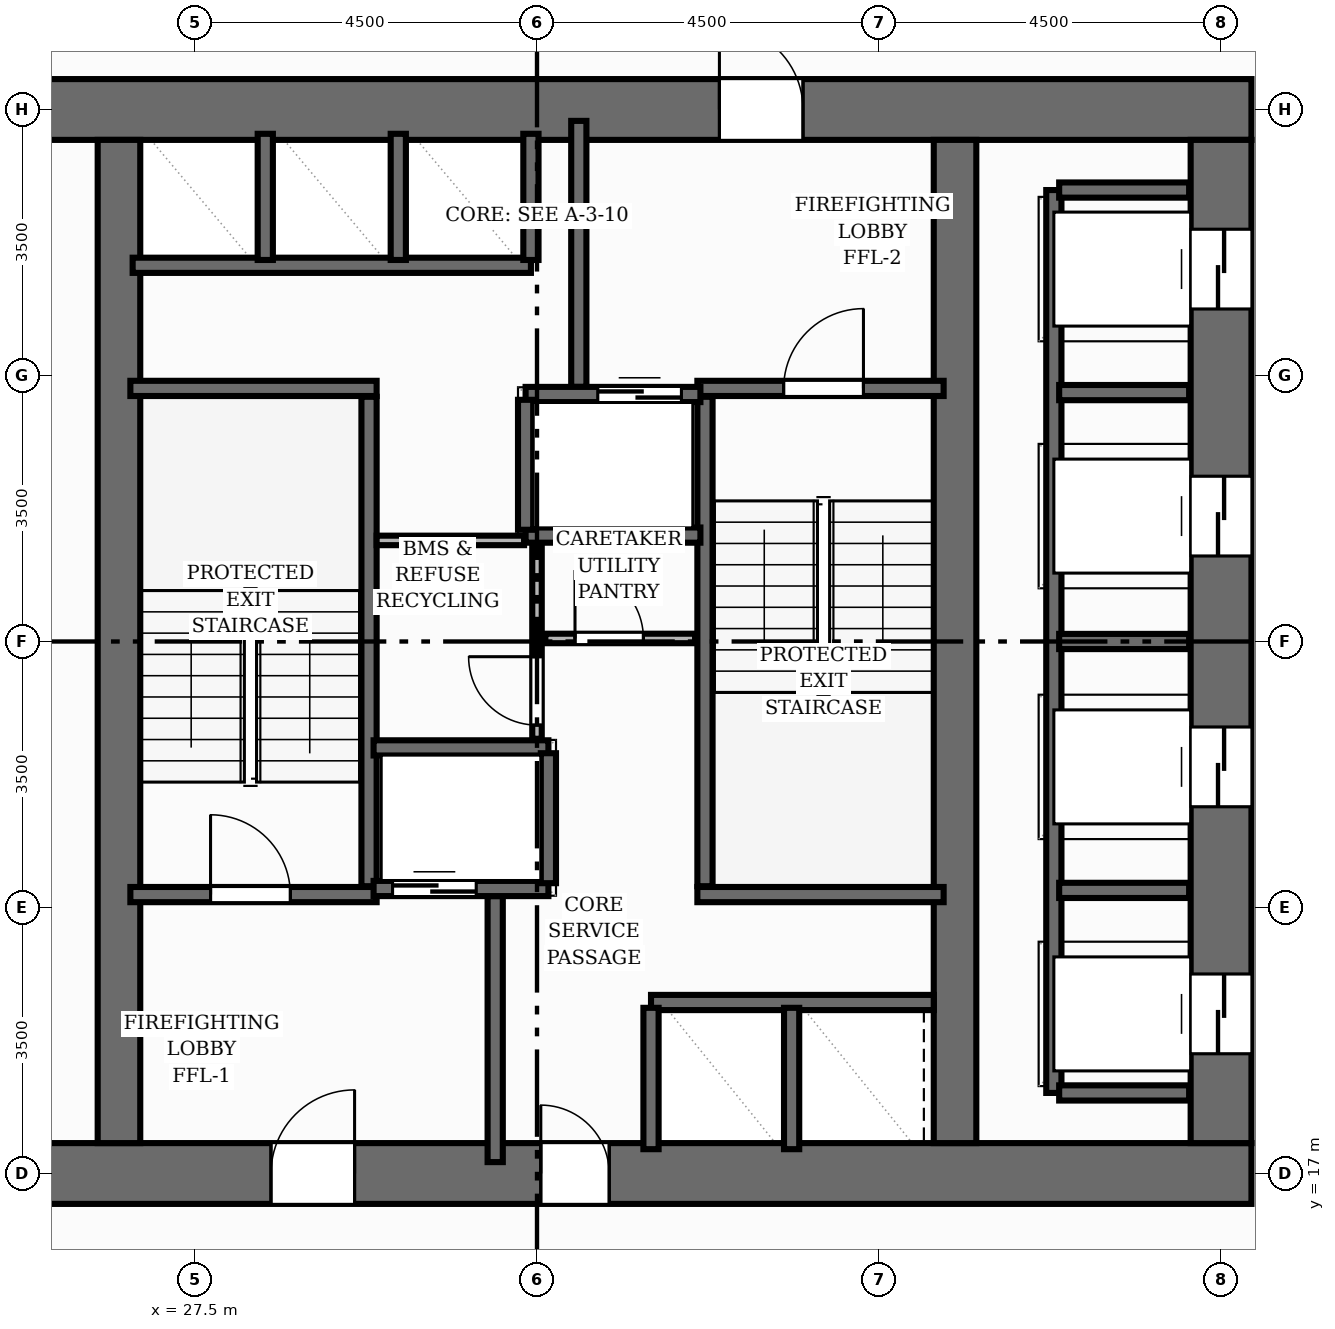
"""IFC4 building model, lengths in metres.
Left out: names, types, materials, properties, quantities, classifications, styles, units other than length and angle.
Written with IfcOpenShell. Run it as: python <this file> out.ifc"""

import sys

from ifc_helpers import new_model, si_unit, direction, frame, frame_2d, origin, place, context, subcontext, project, spatial, rectangle, extrude, element, fill, save


model = new_model("IFC4")
c1 = context("Model", 3, precision=1e-05, world=origin(), true_north=direction((0.0, 1.0)))
c2 = subcontext(c1, "Body", "Model", "MODEL_VIEW")
j1 = project(units=[si_unit("LENGTHUNIT", "METRE"), si_unit("PLANEANGLEUNIT", "RADIAN")], contexts=[c1])
p1 = place(None, origin())
s1 = spatial("IfcSite", under=j1, at=p1, CompositionType="ELEMENT")
p2 = place(p1, origin())
s2 = spatial("IfcBuilding", under=s1, at=p2, CompositionType="ELEMENT")
p3 = place(p2, frame((0.0, 0.0, 37.6)))
s3 = spatial("IfcBuildingStorey", under=s2, at=p3, CompositionType="ELEMENT", Elevation=37.6)
p4 = place(p3, frame((22.6, 17.0, 0.0), z_axis=(0.0, 0.0, 1.0), x_axis=(1.0, 0.0, 0.0)))
e1 = element("IfcWall", 1, at=p4, inside=s3, PredefinedType="SHEAR", context=c2, shape_type="SweptSolid", body=[
    extrude(rectangle(XDim=18.8, YDim=0.8, at=frame_2d((9.4, 0.0))), origin(), (0.0, 0.0, 1.0), 3.2),
])
p5 = place(p4, frame((5.9, 0.0, 0.0)))
e2 = element("IfcOpeningElement", 2, at=p5, cuts=e1, PredefinedType="OPENING", context=c2, shape_type="SweptSolid", body=[
    extrude(rectangle(XDim=1.1, YDim=2.15, at=frame_2d((0.55, 1.075))), frame((0.0, 0.41, 0.0), z_axis=(0.0, -1.0, 0.0), x_axis=(1.0, 0.0, 0.0)), (0.0, 0.0, 1.0), 0.82),
])
p6 = place(p4, frame((9.45, 0.0, 0.0)))
e3 = element("IfcOpeningElement", 3, at=p6, cuts=e1, PredefinedType="OPENING", context=c2, shape_type="SweptSolid", body=[
    extrude(rectangle(XDim=0.9, YDim=2.1, at=frame_2d((0.45, 1.05))), frame((0.0, 0.41, 0.0), z_axis=(0.0, -1.0, 0.0), x_axis=(1.0, 0.0, 0.0)), (0.0, 0.0, 1.0), 0.82),
])
p7 = place(p3, frame((22.6, 31.0, 0.0), z_axis=(0.0, 0.0, 1.0), x_axis=(1.0, 0.0, 0.0)))
e4 = element("IfcWall", 4, at=p7, inside=s3, PredefinedType="SHEAR", context=c2, shape_type="SweptSolid", body=[
    extrude(rectangle(XDim=18.8, YDim=0.8, at=frame_2d((9.4, 0.0))), origin(), (0.0, 0.0, 1.0), 3.2),
])
p8 = place(p7, frame((11.8, 0.0, 0.0)))
e5 = element("IfcOpeningElement", 5, at=p8, cuts=e4, PredefinedType="OPENING", context=c2, shape_type="SweptSolid", body=[
    extrude(rectangle(XDim=1.1, YDim=2.15, at=frame_2d((0.55, 1.075))), frame((0.0, 0.41, 0.0), z_axis=(0.0, -1.0, 0.0), x_axis=(1.0, 0.0, 0.0)), (0.0, 0.0, 1.0), 0.82),
])
p9 = place(p3, frame((41.0, 17.4, 0.0), z_axis=(0.0, 0.0, 1.0), x_axis=(0.0, 1.0, 0.0)))
e6 = element("IfcWall", 6, at=p9, inside=s3, PredefinedType="SHEAR", context=c2, shape_type="SweptSolid", body=[
    extrude(rectangle(XDim=13.2, YDim=0.8, at=frame_2d((6.6, 0.0))), origin(), (0.0, 0.0, 1.0), 3.2),
])
p10 = place(p9, frame((1.175, 0.0, 0.0)))
e7 = element("IfcOpeningElement", 7, at=p10, cuts=e6, PredefinedType="OPENING", context=c2, shape_type="SweptSolid", body=[
    extrude(rectangle(XDim=1.05, YDim=2.15, at=frame_2d((0.525, 1.075))), frame((0.0, 0.41, 0.0), z_axis=(0.0, -1.0, 0.0), x_axis=(1.0, 0.0, 0.0)), (0.0, 0.0, 1.0), 0.82),
])
p11 = place(p9, frame((4.425, 0.0, 0.0)))
e8 = element("IfcOpeningElement", 8, at=p11, cuts=e6, PredefinedType="OPENING", context=c2, shape_type="SweptSolid", body=[
    extrude(rectangle(XDim=1.05, YDim=2.15, at=frame_2d((0.525, 1.075))), frame((0.0, 0.41, 0.0), z_axis=(0.0, -1.0, 0.0), x_axis=(1.0, 0.0, 0.0)), (0.0, 0.0, 1.0), 0.82),
])
p12 = place(p9, frame((7.725, 0.0, 0.0)))
e9 = element("IfcOpeningElement", 9, at=p12, cuts=e6, PredefinedType="OPENING", context=c2, shape_type="SweptSolid", body=[
    extrude(rectangle(XDim=1.05, YDim=2.15, at=frame_2d((0.525, 1.075))), frame((0.0, 0.41, 0.0), z_axis=(0.0, -1.0, 0.0), x_axis=(1.0, 0.0, 0.0)), (0.0, 0.0, 1.0), 0.82),
])
p13 = place(p9, frame((10.975, 0.0, 0.0)))
e10 = element("IfcOpeningElement", 10, at=p13, cuts=e6, PredefinedType="OPENING", context=c2, shape_type="SweptSolid", body=[
    extrude(rectangle(XDim=1.05, YDim=2.15, at=frame_2d((0.525, 1.075))), frame((0.0, 0.41, 0.0), z_axis=(0.0, -1.0, 0.0), x_axis=(1.0, 0.0, 0.0)), (0.0, 0.0, 1.0), 0.82),
])
for number, where, z_axis, x_axis in (
    (11, (26.5, 17.4, 0.0), (0.0, 0.0, 1.0), (0.0, 1.0, 0.0)),
    (12, (37.5, 17.4, 0.0), (0.0, 0.0, 1.0), (0.0, 1.0, 0.0)),
):
    element("IfcWall", number, at=place(p3, frame(where, z_axis=z_axis, x_axis=x_axis)), inside=s3, PredefinedType="SHEAR", context=c2, shape_type="SweptSolid", body=[
        extrude(rectangle(XDim=13.2, YDim=0.56, at=frame_2d((6.6, 0.0))), origin(), (0.0, 0.0, 1.0), 3.2),
    ])
p14 = place(p3, frame((29.79, 20.78, 0.0), z_axis=(0.0, 0.0, 1.0), x_axis=(0.0, 1.0, 0.0)))
e13 = element("IfcWall", 13, at=p14, inside=s3, PredefinedType="SHEAR", context=c2, shape_type="SweptSolid", body=[
    extrude(rectangle(XDim=6.44, YDim=0.2, at=frame_2d((3.22, 0.0))), origin(), (0.0, 0.0, 1.0), 3.2),
])
p15 = place(p3, frame((26.65, 27.33, 0.0), z_axis=(0.0, 0.0, 1.0), x_axis=(1.0, 0.0, 0.0)))
e14 = element("IfcWall", 14, at=p15, inside=s3, PredefinedType="SHEAR", context=c2, shape_type="SweptSolid", body=[
    extrude(rectangle(XDim=3.24, YDim=0.2, at=frame_2d((1.62, 0.0))), origin(), (0.0, 0.0, 1.0), 3.2),
])
p16 = place(p3, frame((26.65, 20.67, 0.0), z_axis=(0.0, 0.0, 1.0), x_axis=(1.0, 0.0, 0.0)))
e15 = element("IfcWall", 15, at=p16, inside=s3, PredefinedType="SHEAR", context=c2, shape_type="SweptSolid", body=[
    extrude(rectangle(XDim=3.24, YDim=0.2, at=frame_2d((1.62, 0.0))), origin(), (0.0, 0.0, 1.0), 3.2),
])
p17 = place(p16, frame((1.055, 0.0, 0.0)))
e16 = element("IfcOpeningElement", 16, at=p17, cuts=e15, PredefinedType="OPENING", context=c2, shape_type="SweptSolid", body=[
    extrude(rectangle(XDim=1.05, YDim=2.15, at=frame_2d((0.525, 1.075))), frame((0.0, 0.11, 0.0), z_axis=(0.0, -1.0, 0.0), x_axis=(1.0, 0.0, 0.0)), (0.0, 0.0, 1.0), 0.22),
])
p18 = place(p3, frame((34.21, 20.78, 0.0), z_axis=(0.0, 0.0, 1.0), x_axis=(0.0, 1.0, 0.0)))
e17 = element("IfcWall", 17, at=p18, inside=s3, PredefinedType="SHEAR", context=c2, shape_type="SweptSolid", body=[
    extrude(rectangle(XDim=6.44, YDim=0.2, at=frame_2d((3.22, 0.0))), origin(), (0.0, 0.0, 1.0), 3.2),
])
p19 = place(p3, frame((34.11, 20.67, 0.0), z_axis=(0.0, 0.0, 1.0), x_axis=(1.0, 0.0, 0.0)))
e18 = element("IfcWall", 18, at=p19, inside=s3, PredefinedType="SHEAR", context=c2, shape_type="SweptSolid", body=[
    extrude(rectangle(XDim=3.24, YDim=0.2, at=frame_2d((1.62, 0.0))), origin(), (0.0, 0.0, 1.0), 3.2),
])
p20 = place(p3, frame((34.11, 27.33, 0.0), z_axis=(0.0, 0.0, 1.0), x_axis=(1.0, 0.0, 0.0)))
e19 = element("IfcWall", 19, at=p20, inside=s3, PredefinedType="SHEAR", context=c2, shape_type="SweptSolid", body=[
    extrude(rectangle(XDim=3.24, YDim=0.2, at=frame_2d((1.62, 0.0))), origin(), (0.0, 0.0, 1.0), 3.2),
])
p21 = place(p20, frame((1.135, 0.0, 0.0)))
e20 = element("IfcOpeningElement", 20, at=p21, cuts=e19, PredefinedType="OPENING", context=c2, shape_type="SweptSolid", body=[
    extrude(rectangle(XDim=1.05, YDim=2.15, at=frame_2d((0.525, 1.075))), frame((0.0, 0.11, 0.0), z_axis=(0.0, -1.0, 0.0), x_axis=(1.0, 0.0, 0.0)), (0.0, 0.0, 1.0), 0.22),
])
for number, where, z_axis, x_axis in (
    (21, (31.45, 17.15, 0.0), (0.0, 0.0, 1.0), (0.0, 1.0, 0.0)),
    (22, (32.55, 27.35, 0.0), (0.0, 0.0, 1.0), (0.0, 1.0, 0.0)),
):
    element("IfcWall", number, at=place(p3, frame(where, z_axis=z_axis, x_axis=x_axis)), inside=s3, PredefinedType="SHEAR", context=c2, shape_type="SweptSolid", body=[
        extrude(rectangle(XDim=3.5, YDim=0.2, at=frame_2d((1.75, 0.0))), origin(), (0.0, 0.0, 1.0), 3.2),
    ])
p22 = place(p3, frame((29.85, 20.75, 0.0), z_axis=(0.0, 0.0, 1.0), x_axis=(1.0, 0.0, 0.0)))
e23 = element("IfcWall", 23, at=p22, inside=s3, PredefinedType="SHEAR", context=c2, shape_type="SweptSolid", body=[
    extrude(rectangle(XDim=2.3, YDim=0.2, at=frame_2d((1.15, 0.0))), origin(), (0.0, 0.0, 1.0), 3.2),
])
p23 = place(p22, frame((0.25, 0.0, 0.0)))
e24 = element("IfcOpeningElement", 24, at=p23, cuts=e23, PredefinedType="OPENING", context=c2, shape_type="SweptSolid", body=[
    extrude(rectangle(XDim=1.1, YDim=2.15, at=frame_2d((0.55, 1.075))), frame((0.0, 0.11, 0.0), z_axis=(0.0, -1.0, 0.0), x_axis=(1.0, 0.0, 0.0)), (0.0, 0.0, 1.0), 0.22),
])
p24 = place(p3, frame((29.85, 22.6, 0.0), z_axis=(0.0, 0.0, 1.0), x_axis=(1.0, 0.0, 0.0)))
e25 = element("IfcWall", 25, at=p24, inside=s3, PredefinedType="SHEAR", context=c2, shape_type="SweptSolid", body=[
    extrude(rectangle(XDim=2.3, YDim=0.2, at=frame_2d((1.15, 0.0))), origin(), (0.0, 0.0, 1.0), 3.2),
])
p25 = place(p3, frame((32.15, 20.82, 0.0), z_axis=(0.0, 0.0, 1.0), x_axis=(0.0, 1.0, 0.0)))
e26 = element("IfcWall", 26, at=p25, inside=s3, PredefinedType="SHEAR", context=c2, shape_type="SweptSolid", body=[
    extrude(rectangle(XDim=1.71, YDim=0.2, at=frame_2d((0.855, 0.0))), origin(), (0.0, 0.0, 1.0), 3.2),
])
p26 = place(p3, frame((31.85, 27.25, 0.0), z_axis=(0.0, 0.0, 1.0), x_axis=(1.0, 0.0, 0.0)))
e27 = element("IfcWall", 27, at=p26, inside=s3, PredefinedType="SHEAR", context=c2, shape_type="SweptSolid", body=[
    extrude(rectangle(XDim=2.3, YDim=0.2, at=frame_2d((1.15, 0.0))), origin(), (0.0, 0.0, 1.0), 3.2),
])
p27 = place(p26, frame((0.95, 0.0, 0.0)))
e28 = element("IfcOpeningElement", 28, at=p27, cuts=e27, PredefinedType="OPENING", context=c2, shape_type="SweptSolid", body=[
    extrude(rectangle(XDim=1.1, YDim=2.15, at=frame_2d((0.55, 1.075))), frame((0.0, 0.11, 0.0), z_axis=(0.0, -1.0, 0.0), x_axis=(1.0, 0.0, 0.0)), (0.0, 0.0, 1.0), 0.22),
])
p28 = place(p3, frame((31.85, 25.4, 0.0), z_axis=(0.0, 0.0, 1.0), x_axis=(1.0, 0.0, 0.0)))
e29 = element("IfcWall", 29, at=p28, inside=s3, PredefinedType="SHEAR", context=c2, shape_type="SweptSolid", body=[
    extrude(rectangle(XDim=2.3, YDim=0.2, at=frame_2d((1.15, 0.0))), origin(), (0.0, 0.0, 1.0), 3.2),
])
p29 = place(p3, frame((31.85, 25.47, 0.0), z_axis=(0.0, 0.0, 1.0), x_axis=(0.0, 1.0, 0.0)))
e30 = element("IfcWall", 30, at=p29, inside=s3, PredefinedType="SHEAR", context=c2, shape_type="SweptSolid", body=[
    extrude(rectangle(XDim=1.71, YDim=0.2, at=frame_2d((0.855, 0.0))), origin(), (0.0, 0.0, 1.0), 3.2),
])
p30 = place(p3, frame((38.8, 18.06, 0.0), z_axis=(0.0, 0.0, 1.0), x_axis=(0.0, 1.0, 0.0)))
e31 = element("IfcWall", 31, at=p30, inside=s3, PredefinedType="SHEAR", context=c2, shape_type="SweptSolid", body=[
    extrude(rectangle(XDim=11.88, YDim=0.2, at=frame_2d((5.94, 0.0))), origin(), (0.0, 0.0, 1.0), 3.2),
])
for number, where, z_axis, x_axis in (
    (32, (38.87, 18.06, 0.0), (0.0, 0.0, 1.0), (1.0, 0.0, 0.0)),
    (33, (38.87, 29.94, 0.0), (0.0, 0.0, 1.0), (1.0, 0.0, 0.0)),
    (34, (38.87, 20.725, 0.0), (0.0, 0.0, 1.0), (1.0, 0.0, 0.0)),
    (35, (38.87, 24.0, 0.0), (0.0, 0.0, 1.0), (1.0, 0.0, 0.0)),
    (36, (38.87, 27.275, 0.0), (0.0, 0.0, 1.0), (1.0, 0.0, 0.0)),
):
    element("IfcWall", number, at=place(p3, frame(where, z_axis=z_axis, x_axis=x_axis)), inside=s3, PredefinedType="SHEAR", context=c2, shape_type="SweptSolid", body=[
        extrude(rectangle(XDim=1.71, YDim=0.2, at=frame_2d((0.855, 0.0))), origin(), (0.0, 0.0, 1.0), 3.2),
    ])
p31 = place(p3, frame((26.68, 28.95, 0.0), z_axis=(0.0, 0.0, 1.0), x_axis=(1.0, 0.0, 0.0)))
e37 = element("IfcWall", 37, at=p31, inside=s3, PredefinedType="SHEAR", context=c2, shape_type="SweptSolid", body=[
    extrude(rectangle(XDim=5.24, YDim=0.2, at=frame_2d((2.62, 0.0))), origin(), (0.0, 0.0, 1.0), 3.2),
])
for number, where, z_axis, x_axis in (
    (38, (31.92, 29.02, 0.0), (0.0, 0.0, 1.0), (0.0, 1.0, 0.0)),
    (39, (28.425, 29.02, 0.0), (0.0, 0.0, 1.0), (0.0, 1.0, 0.0)),
    (40, (30.175, 29.02, 0.0), (0.0, 0.0, 1.0), (0.0, 1.0, 0.0)),
):
    element("IfcWall", number, at=place(p3, frame(where, z_axis=z_axis, x_axis=x_axis)), inside=s3, PredefinedType="SHEAR", context=c2, shape_type="SweptSolid", body=[
        extrude(rectangle(XDim=1.66, YDim=0.2, at=frame_2d((0.83, 0.0))), origin(), (0.0, 0.0, 1.0), 3.2),
    ])
p32 = place(p3, frame((33.5, 19.25, 0.0), z_axis=(0.0, 0.0, 1.0), x_axis=(1.0, 0.0, 0.0)))
e41 = element("IfcWall", 41, at=p32, inside=s3, PredefinedType="SHEAR", context=c2, shape_type="SweptSolid", body=[
    extrude(rectangle(XDim=3.72, YDim=0.2, at=frame_2d((1.86, 0.0))), origin(), (0.0, 0.0, 1.0), 3.2),
])
for number, where, z_axis, x_axis in (
    (42, (33.5, 17.32, 0.0), (0.0, 0.0, 1.0), (0.0, 1.0, 0.0)),
    (43, (35.35, 17.32, 0.0), (0.0, 0.0, 1.0), (0.0, 1.0, 0.0)),
):
    element("IfcWall", number, at=place(p3, frame(where, z_axis=z_axis, x_axis=x_axis)), inside=s3, PredefinedType="SHEAR", context=c2, shape_type="SweptSolid", body=[
        extrude(rectangle(XDim=1.86, YDim=0.2, at=frame_2d((0.93, 0.0))), origin(), (0.0, 0.0, 1.0), 3.2),
    ])
p33 = place(p3, frame((32.0, 22.72, 0.0), z_axis=(0.0, 0.0, 1.0), x_axis=(0.0, 1.0, 0.0)))
e44 = element("IfcWall", 44, at=p33, inside=s3, PredefinedType="PARTITIONING", context=c2, shape_type="SweptSolid", body=[
    extrude(rectangle(XDim=2.52, YDim=0.125, at=frame_2d((1.26, 0.0))), origin(), (0.0, 0.0, 1.0), 2.955),
])
p34 = place(p33, frame((0.18, 0.0, 0.0)))
e45 = element("IfcOpeningElement", 45, at=p34, cuts=e44, PredefinedType="OPENING", context=c2, shape_type="SweptSolid", body=[
    extrude(rectangle(XDim=0.9, YDim=2.1, at=frame_2d((0.45, 1.05))), frame((0.0, 0.073, 0.0), z_axis=(0.0, -1.0, 0.0), x_axis=(1.0, 0.0, 0.0)), (0.0, 0.0, 1.0), 0.145),
])
p35 = place(p3, frame((32.11, 24.04, 0.0), z_axis=(0.0, 0.0, 1.0), x_axis=(1.0, 0.0, 0.0)))
e46 = element("IfcWall", 46, at=p35, inside=s3, PredefinedType="PARTITIONING", context=c2, shape_type="SweptSolid", body=[
    extrude(rectangle(XDim=1.97, YDim=0.125, at=frame_2d((0.985, 0.0))), origin(), (0.0, 0.0, 1.0), 2.955),
])
p36 = place(p35, frame((0.39, 0.0, 0.0)))
e47 = element("IfcOpeningElement", 47, at=p36, cuts=e46, PredefinedType="OPENING", context=c2, shape_type="SweptSolid", body=[
    extrude(rectangle(XDim=0.9, YDim=2.1, at=frame_2d((0.45, 1.05))), frame((0.0, 0.073, 0.0), z_axis=(0.0, -1.0, 0.0), x_axis=(1.0, 0.0, 0.0)), (0.0, 0.0, 1.0), 0.145),
])
p37 = place(p3, frame((29.89, 25.33, 0.0), z_axis=(0.0, 0.0, 1.0), x_axis=(1.0, 0.0, 0.0)))
e48 = element("IfcWall", 48, at=p37, inside=s3, PredefinedType="PARTITIONING", context=c2, shape_type="SweptSolid", body=[
    extrude(rectangle(XDim=1.94, YDim=0.125, at=frame_2d((0.97, 0.0))), origin(), (0.0, 0.0, 1.0), 2.955),
])
p38 = place(p17, origin())
e49 = element("IfcDoor", 49, at=p38, inside=s3, OperationType="SINGLE_SWING_LEFT", PredefinedType="DOOR", context=c2, shape_type="SweptSolid", body=[
    extrude(rectangle(XDim=1.05, YDim=2.15, at=frame_2d((0.525, 1.075))), frame((0.0, 0.025, 0.0), z_axis=(0.0, -1.0, 0.0), x_axis=(1.0, 0.0, 0.0)), (0.0, 0.0, 1.0), 0.05),
])
fill(e16, e49)
p39 = place(p21, origin())
e50 = element("IfcDoor", 50, at=p39, inside=s3, OperationType="SINGLE_SWING_RIGHT", PredefinedType="DOOR", context=c2, shape_type="SweptSolid", body=[
    extrude(rectangle(XDim=1.05, YDim=2.15, at=frame_2d((0.525, 1.075))), frame((0.0, 0.025, 0.0), z_axis=(0.0, -1.0, 0.0), x_axis=(1.0, 0.0, 0.0)), (0.0, 0.0, 1.0), 0.05),
])
fill(e20, e50)
p40 = place(p5, origin())
e51 = element("IfcDoor", 51, at=p40, inside=s3, OperationType="SINGLE_SWING_RIGHT", PredefinedType="DOOR", context=c2, shape_type="SweptSolid", body=[
    extrude(rectangle(XDim=1.1, YDim=2.15, at=frame_2d((0.55, 1.075))), frame((0.0, 0.025, 0.0), z_axis=(0.0, -1.0, 0.0), x_axis=(1.0, 0.0, 0.0)), (0.0, 0.0, 1.0), 0.05),
])
fill(e2, e51)
p41 = place(p8, origin())
e52 = element("IfcDoor", 52, at=p41, inside=s3, OperationType="SINGLE_SWING_LEFT", PredefinedType="DOOR", context=c2, shape_type="SweptSolid", body=[
    extrude(rectangle(XDim=1.1, YDim=2.15, at=frame_2d((0.55, 1.075))), frame((0.0, 0.025, 0.0), z_axis=(0.0, -1.0, 0.0), x_axis=(1.0, 0.0, 0.0)), (0.0, 0.0, 1.0), 0.05),
])
fill(e5, e52)
p42 = place(p23, origin())
e53 = element("IfcDoor", 53, at=p42, inside=s3, OperationType="DOUBLE_DOOR_SLIDING", PredefinedType="DOOR", context=c2, shape_type="SweptSolid", body=[
    extrude(rectangle(XDim=1.1, YDim=2.15, at=frame_2d((0.55, 1.075))), frame((0.0, 0.025, 0.0), z_axis=(0.0, -1.0, 0.0), x_axis=(1.0, 0.0, 0.0)), (0.0, 0.0, 1.0), 0.05),
])
fill(e24, e53)
p43 = place(p27, origin())
e54 = element("IfcDoor", 54, at=p43, inside=s3, OperationType="DOUBLE_DOOR_SLIDING", PredefinedType="DOOR", context=c2, shape_type="SweptSolid", body=[
    extrude(rectangle(XDim=1.1, YDim=2.15, at=frame_2d((0.55, 1.075))), frame((0.0, 0.025, 0.0), z_axis=(0.0, -1.0, 0.0), x_axis=(1.0, 0.0, 0.0)), (0.0, 0.0, 1.0), 0.05),
])
fill(e28, e54)
p44 = place(p10, origin())
e55 = element("IfcDoor", 55, at=p44, inside=s3, OperationType="DOUBLE_DOOR_SLIDING", PredefinedType="DOOR", context=c2, shape_type="SweptSolid", body=[
    extrude(rectangle(XDim=1.05, YDim=2.15, at=frame_2d((0.525, 1.075))), frame((0.0, 0.025, 0.0), z_axis=(0.0, -1.0, 0.0), x_axis=(1.0, 0.0, 0.0)), (0.0, 0.0, 1.0), 0.05),
])
fill(e7, e55)
p45 = place(p11, origin())
e56 = element("IfcDoor", 56, at=p45, inside=s3, OperationType="DOUBLE_DOOR_SLIDING", PredefinedType="DOOR", context=c2, shape_type="SweptSolid", body=[
    extrude(rectangle(XDim=1.05, YDim=2.15, at=frame_2d((0.525, 1.075))), frame((0.0, 0.025, 0.0), z_axis=(0.0, -1.0, 0.0), x_axis=(1.0, 0.0, 0.0)), (0.0, 0.0, 1.0), 0.05),
])
fill(e8, e56)
p46 = place(p12, origin())
e57 = element("IfcDoor", 57, at=p46, inside=s3, OperationType="DOUBLE_DOOR_SLIDING", PredefinedType="DOOR", context=c2, shape_type="SweptSolid", body=[
    extrude(rectangle(XDim=1.05, YDim=2.15, at=frame_2d((0.525, 1.075))), frame((0.0, 0.025, 0.0), z_axis=(0.0, -1.0, 0.0), x_axis=(1.0, 0.0, 0.0)), (0.0, 0.0, 1.0), 0.05),
])
fill(e9, e57)
p47 = place(p13, origin())
e58 = element("IfcDoor", 58, at=p47, inside=s3, OperationType="DOUBLE_DOOR_SLIDING", PredefinedType="DOOR", context=c2, shape_type="SweptSolid", body=[
    extrude(rectangle(XDim=1.05, YDim=2.15, at=frame_2d((0.525, 1.075))), frame((0.0, 0.025, 0.0), z_axis=(0.0, -1.0, 0.0), x_axis=(1.0, 0.0, 0.0)), (0.0, 0.0, 1.0), 0.05),
])
fill(e10, e58)
p48 = place(p6, origin())
e59 = element("IfcDoor", 59, at=p48, inside=s3, OperationType="SINGLE_SWING_LEFT", PredefinedType="DOOR", context=c2, shape_type="SweptSolid", body=[
    extrude(rectangle(XDim=0.9, YDim=2.1, at=frame_2d((0.45, 1.05))), frame((0.0, 0.025, 0.0), z_axis=(0.0, -1.0, 0.0), x_axis=(1.0, 0.0, 0.0)), (0.0, 0.0, 1.0), 0.05),
])
fill(e3, e59)
p49 = place(p36, origin())
e60 = element("IfcDoor", 60, at=p49, inside=s3, OperationType="SINGLE_SWING_LEFT", PredefinedType="DOOR", context=c2, shape_type="SweptSolid", body=[
    extrude(rectangle(XDim=0.9, YDim=2.1, at=frame_2d((0.45, 1.05))), frame((0.0, 0.025, 0.0), z_axis=(0.0, -1.0, 0.0), x_axis=(1.0, 0.0, 0.0)), (0.0, 0.0, 1.0), 0.05),
])
fill(e47, e60)
p50 = place(p34, origin())
e61 = element("IfcDoor", 61, at=p50, inside=s3, OperationType="SINGLE_SWING_RIGHT", PredefinedType="DOOR", context=c2, shape_type="SweptSolid", body=[
    extrude(rectangle(XDim=0.9, YDim=2.1, at=frame_2d((0.45, 1.05))), frame((0.0, 0.025, 0.0), z_axis=(0.0, -1.0, 0.0), x_axis=(1.0, 0.0, 0.0)), (0.0, 0.0, 1.0), 0.05),
])
fill(e45, e61)
save(model, sys.argv[1])
